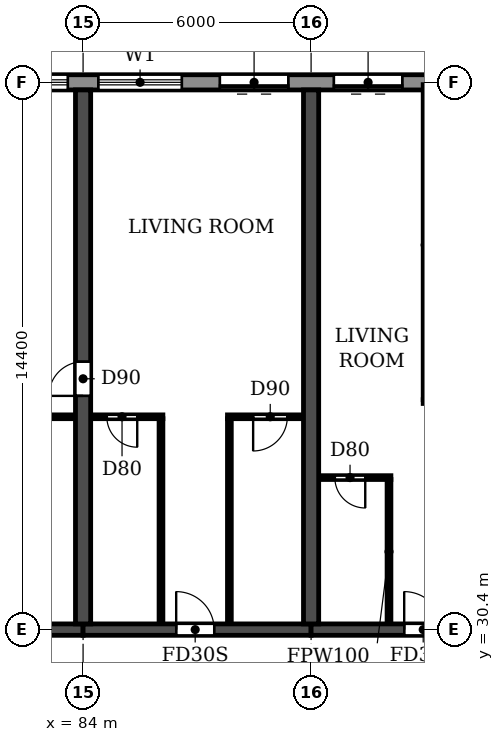
"""IFC4 building model, lengths in metres.
Left out: names, types, materials, properties, quantities, classifications, styles, units other than length and angle.
Written with IfcOpenShell. Run it as: python <this file> out.ifc"""

import sys

from ifc_helpers import new_model, si_unit, direction, frame, frame_2d, origin, place, context, subcontext, project, spatial, rectangle, extrude, element, fill, save


model = new_model("IFC4")
c1 = context("Model", 3, precision=1e-05, world=origin(), true_north=direction((0.0, 1.0)))
c2 = subcontext(c1, "Body", "Model", "MODEL_VIEW")
j1 = project(units=[si_unit("LENGTHUNIT", "METRE"), si_unit("PLANEANGLEUNIT", "RADIAN")], contexts=[c1])
p1 = place(None, origin())
s1 = spatial("IfcSite", under=j1, at=p1, CompositionType="ELEMENT")
p2 = place(p1, origin())
s2 = spatial("IfcBuilding", under=s1, at=p2, CompositionType="ELEMENT")
p3 = place(p2, frame((0.0, 0.0, 23.4)))
s3 = spatial("IfcBuildingStorey", under=s2, at=p3, CompositionType="ELEMENT", Elevation=23.4)
p4 = place(p3, frame((84.0, 30.55, 0.0), z_axis=(0.0, 0.0, 1.0), x_axis=(0.0, 1.0, 0.0)))
e1 = element("IfcWall", 1, at=p4, inside=s3, PredefinedType="SHEAR", context=c2, shape_type="SweptSolid", body=[
    extrude(rectangle(XDim=14.05, YDim=0.4, at=frame_2d((7.025, 0.0))), origin(), (0.0, 0.0, 1.0), 3.05),
])
p5 = place(p4, frame((6.0, 0.0, 0.0)))
e2 = element("IfcOpeningElement", 2, at=p5, cuts=e1, PredefinedType="OPENING", context=c2, shape_type="SweptSolid", body=[
    extrude(rectangle(XDim=0.9, YDim=2.1, at=frame_2d((0.45, 1.05))), frame((0.0, 0.21, 0.0), z_axis=(0.0, -1.0, 0.0), x_axis=(1.0, 0.0, 0.0)), (0.0, 0.0, 1.0), 0.42),
])
p6 = place(p3, frame((90.0, 30.55, 0.0), z_axis=(0.0, 0.0, 1.0), x_axis=(0.0, 1.0, 0.0)))
e3 = element("IfcWall", 3, at=p6, inside=s3, PredefinedType="SHEAR", context=c2, shape_type="SweptSolid", body=[
    extrude(rectangle(XDim=14.05, YDim=0.4, at=frame_2d((7.025, 0.0))), origin(), (0.0, 0.0, 1.0), 3.05),
])
p7 = place(p3, frame((78.0, 30.4, 0.0), z_axis=(0.0, 0.0, 1.0), x_axis=(1.0, 0.0, 0.0)))
e4 = element("IfcWall", 4, at=p7, inside=s3, PredefinedType="SHEAR", context=c2, shape_type="SweptSolid", body=[
    extrude(rectangle(XDim=6.0, YDim=0.3, at=frame_2d((3.0, 0.0))), origin(), (0.0, 0.0, 1.0), 2.45),
])
p8 = place(p3, frame((84.0, 30.4, 0.0), z_axis=(0.0, 0.0, 1.0), x_axis=(1.0, 0.0, 0.0)))
e5 = element("IfcWall", 5, at=p8, inside=s3, PredefinedType="SHEAR", context=c2, shape_type="SweptSolid", body=[
    extrude(rectangle(XDim=6.0, YDim=0.3, at=frame_2d((3.0, 0.0))), origin(), (0.0, 0.0, 1.0), 2.45),
])
p9 = place(p8, frame((2.45, 0.0, 0.0)))
e6 = element("IfcOpeningElement", 6, at=p9, cuts=e5, PredefinedType="OPENING", context=c2, shape_type="SweptSolid", body=[
    extrude(rectangle(XDim=1.0, YDim=2.1, at=frame_2d((0.5, 1.05))), frame((0.0, 0.16, 0.0), z_axis=(0.0, -1.0, 0.0), x_axis=(1.0, 0.0, 0.0)), (0.0, 0.0, 1.0), 0.32),
])
p10 = place(p3, frame((90.0, 30.4, 0.0), z_axis=(0.0, 0.0, 1.0), x_axis=(1.0, 0.0, 0.0)))
e7 = element("IfcWall", 7, at=p10, inside=s3, PredefinedType="SHEAR", context=c2, shape_type="SweptSolid", body=[
    extrude(rectangle(XDim=6.0, YDim=0.3, at=frame_2d((3.0, 0.0))), origin(), (0.0, 0.0, 1.0), 2.45),
])
p11 = place(p10, frame((2.45, 0.0, 0.0)))
e8 = element("IfcOpeningElement", 8, at=p11, cuts=e7, PredefinedType="OPENING", context=c2, shape_type="SweptSolid", body=[
    extrude(rectangle(XDim=1.0, YDim=2.1, at=frame_2d((0.5, 1.05))), frame((0.0, 0.16, 0.0), z_axis=(0.0, -1.0, 0.0), x_axis=(1.0, 0.0, 0.0)), (0.0, 0.0, 1.0), 0.32),
])
p12 = place(p3, frame((97.317, 44.8, 0.0), z_axis=(0.0, 0.0, 1.0), x_axis=(-1.0, 0.0, 0.0)))
e9 = element("IfcWall", 9, at=p12, inside=s3, PredefinedType="STANDARD", context=c2, shape_type="SweptSolid", body=[
    extrude(rectangle(XDim=92.634, YDim=0.4, at=frame_2d((46.317, 0.0))), origin(), (0.0, 0.0, 1.0), 3.05),
])
p13 = place(p12, frame((88.717, 0.0, 0.9)))
e10 = element("IfcOpeningElement", 10, at=p13, cuts=e9, PredefinedType="OPENING", context=c2, shape_type="SweptSolid", body=[
    extrude(rectangle(XDim=2.2, YDim=1.5, at=frame_2d((1.1, 0.75))), frame((0.0, 0.21, 0.0), z_axis=(0.0, -1.0, 0.0), x_axis=(1.0, 0.0, 0.0)), (0.0, 0.0, 1.0), 0.42),
])
p14 = place(p12, frame((85.917, 0.0, 0.0)))
e11 = element("IfcOpeningElement", 11, at=p14, cuts=e9, PredefinedType="OPENING", context=c2, shape_type="SweptSolid", body=[
    extrude(rectangle(XDim=1.8, YDim=2.4, at=frame_2d((0.9, 1.2))), frame((0.0, 0.21, 0.0), z_axis=(0.0, -1.0, 0.0), x_axis=(1.0, 0.0, 0.0)), (0.0, 0.0, 1.0), 0.42),
])
p15 = place(p12, frame((82.717, 0.0, 0.9)))
e12 = element("IfcOpeningElement", 12, at=p15, cuts=e9, PredefinedType="OPENING", context=c2, shape_type="SweptSolid", body=[
    extrude(rectangle(XDim=2.2, YDim=1.5, at=frame_2d((1.1, 0.75))), frame((0.0, 0.21, 0.0), z_axis=(0.0, -1.0, 0.0), x_axis=(1.0, 0.0, 0.0)), (0.0, 0.0, 1.0), 0.42),
])
p16 = place(p12, frame((79.717, 0.0, 0.9)))
e13 = element("IfcOpeningElement", 13, at=p16, cuts=e9, PredefinedType="OPENING", context=c2, shape_type="SweptSolid", body=[
    extrude(rectangle(XDim=2.2, YDim=1.5, at=frame_2d((1.1, 0.75))), frame((0.0, 0.21, 0.0), z_axis=(0.0, -1.0, 0.0), x_axis=(1.0, 0.0, 0.0)), (0.0, 0.0, 1.0), 0.42),
])
p17 = place(p12, frame((76.917, 0.0, 0.0)))
e14 = element("IfcOpeningElement", 14, at=p17, cuts=e9, PredefinedType="OPENING", context=c2, shape_type="SweptSolid", body=[
    extrude(rectangle(XDim=1.8, YDim=2.4, at=frame_2d((0.9, 1.2))), frame((0.0, 0.21, 0.0), z_axis=(0.0, -1.0, 0.0), x_axis=(1.0, 0.0, 0.0)), (0.0, 0.0, 1.0), 0.42),
])
p18 = place(p12, frame((73.717, 0.0, 0.9)))
e15 = element("IfcOpeningElement", 15, at=p18, cuts=e9, PredefinedType="OPENING", context=c2, shape_type="SweptSolid", body=[
    extrude(rectangle(XDim=2.2, YDim=1.5, at=frame_2d((1.1, 0.75))), frame((0.0, 0.21, 0.0), z_axis=(0.0, -1.0, 0.0), x_axis=(1.0, 0.0, 0.0)), (0.0, 0.0, 1.0), 0.42),
])
p19 = place(p12, frame((70.717, 0.0, 0.9)))
e16 = element("IfcOpeningElement", 16, at=p19, cuts=e9, PredefinedType="OPENING", context=c2, shape_type="SweptSolid", body=[
    extrude(rectangle(XDim=2.2, YDim=1.5, at=frame_2d((1.1, 0.75))), frame((0.0, 0.21, 0.0), z_axis=(0.0, -1.0, 0.0), x_axis=(1.0, 0.0, 0.0)), (0.0, 0.0, 1.0), 0.42),
])
p20 = place(p12, frame((67.717, 0.0, 0.9)))
e17 = element("IfcOpeningElement", 17, at=p20, cuts=e9, PredefinedType="OPENING", context=c2, shape_type="SweptSolid", body=[
    extrude(rectangle(XDim=2.2, YDim=1.5, at=frame_2d((1.1, 0.75))), frame((0.0, 0.21, 0.0), z_axis=(0.0, -1.0, 0.0), x_axis=(1.0, 0.0, 0.0)), (0.0, 0.0, 1.0), 0.42),
])
p21 = place(p12, frame((64.917, 0.0, 0.0)))
e18 = element("IfcOpeningElement", 18, at=p21, cuts=e9, PredefinedType="OPENING", context=c2, shape_type="SweptSolid", body=[
    extrude(rectangle(XDim=1.8, YDim=2.4, at=frame_2d((0.9, 1.2))), frame((0.0, 0.21, 0.0), z_axis=(0.0, -1.0, 0.0), x_axis=(1.0, 0.0, 0.0)), (0.0, 0.0, 1.0), 0.42),
])
p22 = place(p12, frame((61.717, 0.0, 0.9)))
e19 = element("IfcOpeningElement", 19, at=p22, cuts=e9, PredefinedType="OPENING", context=c2, shape_type="SweptSolid", body=[
    extrude(rectangle(XDim=2.2, YDim=1.5, at=frame_2d((1.1, 0.75))), frame((0.0, 0.21, 0.0), z_axis=(0.0, -1.0, 0.0), x_axis=(1.0, 0.0, 0.0)), (0.0, 0.0, 1.0), 0.42),
])
p23 = place(p12, frame((58.717, 0.0, 0.9)))
e20 = element("IfcOpeningElement", 20, at=p23, cuts=e9, PredefinedType="OPENING", context=c2, shape_type="SweptSolid", body=[
    extrude(rectangle(XDim=2.2, YDim=1.5, at=frame_2d((1.1, 0.75))), frame((0.0, 0.21, 0.0), z_axis=(0.0, -1.0, 0.0), x_axis=(1.0, 0.0, 0.0)), (0.0, 0.0, 1.0), 0.42),
])
p24 = place(p12, frame((55.917, 0.0, 0.0)))
e21 = element("IfcOpeningElement", 21, at=p24, cuts=e9, PredefinedType="OPENING", context=c2, shape_type="SweptSolid", body=[
    extrude(rectangle(XDim=1.8, YDim=2.4, at=frame_2d((0.9, 1.2))), frame((0.0, 0.21, 0.0), z_axis=(0.0, -1.0, 0.0), x_axis=(1.0, 0.0, 0.0)), (0.0, 0.0, 1.0), 0.42),
])
p25 = place(p12, frame((52.917, 0.0, 0.0)))
e22 = element("IfcOpeningElement", 22, at=p25, cuts=e9, PredefinedType="OPENING", context=c2, shape_type="SweptSolid", body=[
    extrude(rectangle(XDim=1.8, YDim=2.4, at=frame_2d((0.9, 1.2))), frame((0.0, 0.21, 0.0), z_axis=(0.0, -1.0, 0.0), x_axis=(1.0, 0.0, 0.0)), (0.0, 0.0, 1.0), 0.42),
])
p26 = place(p12, frame((49.717, 0.0, 0.9)))
e23 = element("IfcOpeningElement", 23, at=p26, cuts=e9, PredefinedType="OPENING", context=c2, shape_type="SweptSolid", body=[
    extrude(rectangle(XDim=2.2, YDim=1.5, at=frame_2d((1.1, 0.75))), frame((0.0, 0.21, 0.0), z_axis=(0.0, -1.0, 0.0), x_axis=(1.0, 0.0, 0.0)), (0.0, 0.0, 1.0), 0.42),
])
p27 = place(p12, frame((46.917, 0.0, 0.0)))
e24 = element("IfcOpeningElement", 24, at=p27, cuts=e9, PredefinedType="OPENING", context=c2, shape_type="SweptSolid", body=[
    extrude(rectangle(XDim=1.8, YDim=2.4, at=frame_2d((0.9, 1.2))), frame((0.0, 0.21, 0.0), z_axis=(0.0, -1.0, 0.0), x_axis=(1.0, 0.0, 0.0)), (0.0, 0.0, 1.0), 0.42),
])
p28 = place(p12, frame((43.717, 0.0, 0.9)))
e25 = element("IfcOpeningElement", 25, at=p28, cuts=e9, PredefinedType="OPENING", context=c2, shape_type="SweptSolid", body=[
    extrude(rectangle(XDim=2.2, YDim=1.5, at=frame_2d((1.1, 0.75))), frame((0.0, 0.21, 0.0), z_axis=(0.0, -1.0, 0.0), x_axis=(1.0, 0.0, 0.0)), (0.0, 0.0, 1.0), 0.42),
])
p29 = place(p12, frame((40.717, 0.0, 0.9)))
e26 = element("IfcOpeningElement", 26, at=p29, cuts=e9, PredefinedType="OPENING", context=c2, shape_type="SweptSolid", body=[
    extrude(rectangle(XDim=2.2, YDim=1.5, at=frame_2d((1.1, 0.75))), frame((0.0, 0.21, 0.0), z_axis=(0.0, -1.0, 0.0), x_axis=(1.0, 0.0, 0.0)), (0.0, 0.0, 1.0), 0.42),
])
p30 = place(p12, frame((37.917, 0.0, 0.0)))
e27 = element("IfcOpeningElement", 27, at=p30, cuts=e9, PredefinedType="OPENING", context=c2, shape_type="SweptSolid", body=[
    extrude(rectangle(XDim=1.8, YDim=2.4, at=frame_2d((0.9, 1.2))), frame((0.0, 0.21, 0.0), z_axis=(0.0, -1.0, 0.0), x_axis=(1.0, 0.0, 0.0)), (0.0, 0.0, 1.0), 0.42),
])
p31 = place(p12, frame((34.917, 0.0, 0.0)))
e28 = element("IfcOpeningElement", 28, at=p31, cuts=e9, PredefinedType="OPENING", context=c2, shape_type="SweptSolid", body=[
    extrude(rectangle(XDim=1.8, YDim=2.4, at=frame_2d((0.9, 1.2))), frame((0.0, 0.21, 0.0), z_axis=(0.0, -1.0, 0.0), x_axis=(1.0, 0.0, 0.0)), (0.0, 0.0, 1.0), 0.42),
])
p32 = place(p12, frame((31.717, 0.0, 0.9)))
e29 = element("IfcOpeningElement", 29, at=p32, cuts=e9, PredefinedType="OPENING", context=c2, shape_type="SweptSolid", body=[
    extrude(rectangle(XDim=2.2, YDim=1.5, at=frame_2d((1.1, 0.75))), frame((0.0, 0.21, 0.0), z_axis=(0.0, -1.0, 0.0), x_axis=(1.0, 0.0, 0.0)), (0.0, 0.0, 1.0), 0.42),
])
p33 = place(p12, frame((28.717, 0.0, 0.9)))
e30 = element("IfcOpeningElement", 30, at=p33, cuts=e9, PredefinedType="OPENING", context=c2, shape_type="SweptSolid", body=[
    extrude(rectangle(XDim=2.2, YDim=1.5, at=frame_2d((1.1, 0.75))), frame((0.0, 0.21, 0.0), z_axis=(0.0, -1.0, 0.0), x_axis=(1.0, 0.0, 0.0)), (0.0, 0.0, 1.0), 0.42),
])
p34 = place(p12, frame((25.717, 0.0, 0.9)))
e31 = element("IfcOpeningElement", 31, at=p34, cuts=e9, PredefinedType="OPENING", context=c2, shape_type="SweptSolid", body=[
    extrude(rectangle(XDim=2.2, YDim=1.5, at=frame_2d((1.1, 0.75))), frame((0.0, 0.21, 0.0), z_axis=(0.0, -1.0, 0.0), x_axis=(1.0, 0.0, 0.0)), (0.0, 0.0, 1.0), 0.42),
])
p35 = place(p12, frame((22.717, 0.0, 0.9)))
e32 = element("IfcOpeningElement", 32, at=p35, cuts=e9, PredefinedType="OPENING", context=c2, shape_type="SweptSolid", body=[
    extrude(rectangle(XDim=2.2, YDim=1.5, at=frame_2d((1.1, 0.75))), frame((0.0, 0.21, 0.0), z_axis=(0.0, -1.0, 0.0), x_axis=(1.0, 0.0, 0.0)), (0.0, 0.0, 1.0), 0.42),
])
p36 = place(p12, frame((19.917, 0.0, 0.0)))
e33 = element("IfcOpeningElement", 33, at=p36, cuts=e9, PredefinedType="OPENING", context=c2, shape_type="SweptSolid", body=[
    extrude(rectangle(XDim=1.8, YDim=2.4, at=frame_2d((0.9, 1.2))), frame((0.0, 0.21, 0.0), z_axis=(0.0, -1.0, 0.0), x_axis=(1.0, 0.0, 0.0)), (0.0, 0.0, 1.0), 0.42),
])
p37 = place(p12, frame((16.717, 0.0, 0.9)))
e34 = element("IfcOpeningElement", 34, at=p37, cuts=e9, PredefinedType="OPENING", context=c2, shape_type="SweptSolid", body=[
    extrude(rectangle(XDim=2.2, YDim=1.5, at=frame_2d((1.1, 0.75))), frame((0.0, 0.21, 0.0), z_axis=(0.0, -1.0, 0.0), x_axis=(1.0, 0.0, 0.0)), (0.0, 0.0, 1.0), 0.42),
])
p38 = place(p12, frame((13.717, 0.0, 0.9)))
e35 = element("IfcOpeningElement", 35, at=p38, cuts=e9, PredefinedType="OPENING", context=c2, shape_type="SweptSolid", body=[
    extrude(rectangle(XDim=2.2, YDim=1.5, at=frame_2d((1.1, 0.75))), frame((0.0, 0.21, 0.0), z_axis=(0.0, -1.0, 0.0), x_axis=(1.0, 0.0, 0.0)), (0.0, 0.0, 1.0), 0.42),
])
p39 = place(p12, frame((10.717, 0.0, 0.9)))
e36 = element("IfcOpeningElement", 36, at=p39, cuts=e9, PredefinedType="OPENING", context=c2, shape_type="SweptSolid", body=[
    extrude(rectangle(XDim=2.2, YDim=1.5, at=frame_2d((1.1, 0.75))), frame((0.0, 0.21, 0.0), z_axis=(0.0, -1.0, 0.0), x_axis=(1.0, 0.0, 0.0)), (0.0, 0.0, 1.0), 0.42),
])
p40 = place(p12, frame((7.917, 0.0, 0.0)))
e37 = element("IfcOpeningElement", 37, at=p40, cuts=e9, PredefinedType="OPENING", context=c2, shape_type="SweptSolid", body=[
    extrude(rectangle(XDim=1.8, YDim=2.4, at=frame_2d((0.9, 1.2))), frame((0.0, 0.21, 0.0), z_axis=(0.0, -1.0, 0.0), x_axis=(1.0, 0.0, 0.0)), (0.0, 0.0, 1.0), 0.42),
])
p41 = place(p12, frame((4.917, 0.0, 0.0)))
e38 = element("IfcOpeningElement", 38, at=p41, cuts=e9, PredefinedType="OPENING", context=c2, shape_type="SweptSolid", body=[
    extrude(rectangle(XDim=1.8, YDim=2.4, at=frame_2d((0.9, 1.2))), frame((0.0, 0.21, 0.0), z_axis=(0.0, -1.0, 0.0), x_axis=(1.0, 0.0, 0.0)), (0.0, 0.0, 1.0), 0.42),
])
p42 = place(p12, frame((1.717, 0.0, 0.9)))
e39 = element("IfcOpeningElement", 39, at=p42, cuts=e9, PredefinedType="OPENING", context=c2, shape_type="SweptSolid", body=[
    extrude(rectangle(XDim=2.2, YDim=1.5, at=frame_2d((1.1, 0.75))), frame((0.0, 0.21, 0.0), z_axis=(0.0, -1.0, 0.0), x_axis=(1.0, 0.0, 0.0)), (0.0, 0.0, 1.0), 0.42),
])
p43 = place(p3, frame((90.21, 34.4, 0.0), z_axis=(0.0, 0.0, 1.0), x_axis=(1.0, 0.0, 0.0)))
e40 = element("IfcWall", 40, at=p43, inside=s3, PredefinedType="PARTITIONING", context=c2, shape_type="SweptSolid", body=[
    extrude(rectangle(XDim=1.89, YDim=0.1, at=frame_2d((0.945, 0.0))), origin(), (0.0, 0.0, 1.0), 3.05),
])
p44 = place(p43, frame((0.415, 0.0, 0.0)))
e41 = element("IfcOpeningElement", 41, at=p44, cuts=e40, PredefinedType="OPENING", context=c2, shape_type="SweptSolid", body=[
    extrude(rectangle(XDim=0.8, YDim=2.1, at=frame_2d((0.4, 1.05))), frame((0.0, 0.06, 0.0), z_axis=(0.0, -1.0, 0.0), x_axis=(1.0, 0.0, 0.0)), (0.0, 0.0, 1.0), 0.12),
])
p45 = place(p3, frame((81.1, 36.0, 0.0), z_axis=(0.0, 0.0, 1.0), x_axis=(1.0, 0.0, 0.0)))
e42 = element("IfcWall", 42, at=p45, inside=s3, PredefinedType="PARTITIONING", context=c2, shape_type="SweptSolid", body=[
    extrude(rectangle(XDim=2.69, YDim=0.1, at=frame_2d((1.345, 0.0))), origin(), (0.0, 0.0, 1.0), 3.05),
])
p46 = place(p45, frame((1.0, 0.0, 0.0)))
e43 = element("IfcOpeningElement", 43, at=p46, cuts=e42, PredefinedType="OPENING", context=c2, shape_type="SweptSolid", body=[
    extrude(rectangle(XDim=0.8, YDim=2.1, at=frame_2d((0.4, 1.05))), frame((0.0, 0.06, 0.0), z_axis=(0.0, -1.0, 0.0), x_axis=(1.0, 0.0, 0.0)), (0.0, 0.0, 1.0), 0.12),
])
p47 = place(p3, frame((84.21, 36.0, 0.0), z_axis=(0.0, 0.0, 1.0), x_axis=(1.0, 0.0, 0.0)))
e44 = element("IfcWall", 44, at=p47, inside=s3, PredefinedType="PARTITIONING", context=c2, shape_type="SweptSolid", body=[
    extrude(rectangle(XDim=1.89, YDim=0.1, at=frame_2d((0.945, 0.0))), origin(), (0.0, 0.0, 1.0), 3.05),
])
p48 = place(p47, frame((0.415, 0.0, 0.0)))
e45 = element("IfcOpeningElement", 45, at=p48, cuts=e44, PredefinedType="OPENING", context=c2, shape_type="SweptSolid", body=[
    extrude(rectangle(XDim=0.8, YDim=2.1, at=frame_2d((0.4, 1.05))), frame((0.0, 0.06, 0.0), z_axis=(0.0, -1.0, 0.0), x_axis=(1.0, 0.0, 0.0)), (0.0, 0.0, 1.0), 0.12),
])
p49 = place(p3, frame((87.8, 36.0, 0.0), z_axis=(0.0, 0.0, 1.0), x_axis=(1.0, 0.0, 0.0)))
e46 = element("IfcWall", 46, at=p49, inside=s3, PredefinedType="PARTITIONING", context=c2, shape_type="SweptSolid", body=[
    extrude(rectangle(XDim=1.99, YDim=0.1, at=frame_2d((0.995, 0.0))), origin(), (0.0, 0.0, 1.0), 3.05),
])
p50 = place(p49, frame((0.675, 0.0, 0.0)))
e47 = element("IfcOpeningElement", 47, at=p50, cuts=e46, PredefinedType="OPENING", context=c2, shape_type="SweptSolid", body=[
    extrude(rectangle(XDim=0.9, YDim=2.1, at=frame_2d((0.45, 1.05))), frame((0.0, 0.06, 0.0), z_axis=(0.0, -1.0, 0.0), x_axis=(1.0, 0.0, 0.0)), (0.0, 0.0, 1.0), 0.12),
])
p51 = place(p3, frame((92.95, 36.4, 0.0), z_axis=(0.0, 0.0, 1.0), x_axis=(1.0, 0.0, 0.0)))
e48 = element("IfcWall", 48, at=p51, inside=s3, PredefinedType="PARTITIONING", context=c2, shape_type="SweptSolid", body=[
    extrude(rectangle(XDim=2.84, YDim=0.1, at=frame_2d((1.42, 0.0))), origin(), (0.0, 0.0, 1.0), 3.05),
])
p52 = place(p51, frame((0.55, 0.0, 0.0)))
e49 = element("IfcOpeningElement", 49, at=p52, cuts=e48, PredefinedType="OPENING", context=c2, shape_type="SweptSolid", body=[
    extrude(rectangle(XDim=0.9, YDim=2.1, at=frame_2d((0.45, 1.05))), frame((0.0, 0.06, 0.0), z_axis=(0.0, -1.0, 0.0), x_axis=(1.0, 0.0, 0.0)), (0.0, 0.0, 1.0), 0.12),
])
for number, where, z_axis, x_axis in (
    (50, (86.05, 30.56, 0.0), (0.0, 0.0, 1.0), (0.0, 1.0, 0.0)),
    (51, (87.85, 30.56, 0.0), (0.0, 0.0, 1.0), (0.0, 1.0, 0.0)),
):
    element("IfcWall", number, at=place(p3, frame(where, z_axis=z_axis, x_axis=x_axis)), inside=s3, PredefinedType="PARTITIONING", context=c2, shape_type="SweptSolid", body=[
        extrude(rectangle(XDim=5.39, YDim=0.1, at=frame_2d((2.695, 0.0))), origin(), (0.0, 0.0, 1.0), 3.05),
    ])
p53 = place(p3, frame((92.05, 30.56, 0.0), z_axis=(0.0, 0.0, 1.0), x_axis=(0.0, 1.0, 0.0)))
e52 = element("IfcWall", 52, at=p53, inside=s3, PredefinedType="PARTITIONING", context=c2, shape_type="SweptSolid", body=[
    extrude(rectangle(XDim=3.79, YDim=0.1, at=frame_2d((1.895, 0.0))), origin(), (0.0, 0.0, 1.0), 3.05),
])
p54 = place(p3, frame((93.0, 36.45, 0.0), z_axis=(0.0, 0.0, 1.0), x_axis=(0.0, 1.0, 0.0)))
e53 = element("IfcWall", 53, at=p54, inside=s3, PredefinedType="PARTITIONING", context=c2, shape_type="SweptSolid", body=[
    extrude(rectangle(XDim=8.29, YDim=0.1, at=frame_2d((4.145, 0.0))), origin(), (0.0, 0.0, 1.0), 3.05),
])
p55 = place(p38, origin())
e54 = element("IfcWindow", 54, at=p55, inside=s3, PartitioningType="DOUBLE_PANEL_HORIZONTAL", PredefinedType="WINDOW", context=c2, shape_type="SweptSolid", body=[
    extrude(rectangle(XDim=2.2, YDim=1.5, at=frame_2d((1.1, 0.75))), frame((0.0, 0.03, 0.0), z_axis=(0.0, -1.0, 0.0), x_axis=(1.0, 0.0, 0.0)), (0.0, 0.0, 1.0), 0.06),
])
fill(e35, e54)
p56 = place(p39, origin())
e55 = element("IfcWindow", 55, at=p56, inside=s3, PartitioningType="DOUBLE_PANEL_HORIZONTAL", PredefinedType="WINDOW", context=c2, shape_type="SweptSolid", body=[
    extrude(rectangle(XDim=2.2, YDim=1.5, at=frame_2d((1.1, 0.75))), frame((0.0, 0.03, 0.0), z_axis=(0.0, -1.0, 0.0), x_axis=(1.0, 0.0, 0.0)), (0.0, 0.0, 1.0), 0.06),
])
fill(e36, e55)
p57 = place(p40, origin())
e56 = element("IfcDoor", 56, at=p57, inside=s3, OperationType="DOUBLE_DOOR_SLIDING", PredefinedType="DOOR", context=c2, shape_type="SweptSolid", body=[
    extrude(rectangle(XDim=1.8, YDim=2.4, at=frame_2d((0.9, 1.2))), frame((0.0, 0.025, 0.0), z_axis=(0.0, -1.0, 0.0), x_axis=(1.0, 0.0, 0.0)), (0.0, 0.0, 1.0), 0.05),
])
fill(e37, e56)
p58 = place(p41, origin())
e57 = element("IfcDoor", 57, at=p58, inside=s3, OperationType="DOUBLE_DOOR_SLIDING", PredefinedType="DOOR", context=c2, shape_type="SweptSolid", body=[
    extrude(rectangle(XDim=1.8, YDim=2.4, at=frame_2d((0.9, 1.2))), frame((0.0, 0.025, 0.0), z_axis=(0.0, -1.0, 0.0), x_axis=(1.0, 0.0, 0.0)), (0.0, 0.0, 1.0), 0.05),
])
fill(e38, e57)
p59 = place(p5, origin())
e58 = element("IfcDoor", 58, at=p59, inside=s3, OperationType="SINGLE_SWING_LEFT", PredefinedType="DOOR", context=c2, shape_type="SweptSolid", body=[
    extrude(rectangle(XDim=0.9, YDim=2.1, at=frame_2d((0.45, 1.05))), frame((0.0, 0.025, 0.0), z_axis=(0.0, -1.0, 0.0), x_axis=(1.0, 0.0, 0.0)), (0.0, 0.0, 1.0), 0.05),
])
fill(e2, e58)
p60 = place(p48, frame((0.8, 0.0, 0.0), z_axis=(0.0, 0.0, 1.0), x_axis=(-1.0, 0.0, 0.0)))
e59 = element("IfcDoor", 59, at=p60, inside=s3, OperationType="SINGLE_SWING_LEFT", PredefinedType="DOOR", context=c2, shape_type="SweptSolid", body=[
    extrude(rectangle(XDim=0.8, YDim=2.1, at=frame_2d((0.4, 1.05))), frame((0.0, 0.025, 0.0), z_axis=(0.0, -1.0, 0.0), x_axis=(1.0, 0.0, 0.0)), (0.0, 0.0, 1.0), 0.05),
])
fill(e45, e59)
p61 = place(p9, origin())
e60 = element("IfcDoor", 60, at=p61, inside=s3, OperationType="SINGLE_SWING_LEFT", PredefinedType="DOOR", context=c2, shape_type="SweptSolid", body=[
    extrude(rectangle(XDim=1.0, YDim=2.1, at=frame_2d((0.5, 1.05))), frame((0.0, 0.025, 0.0), z_axis=(0.0, -1.0, 0.0), x_axis=(1.0, 0.0, 0.0)), (0.0, 0.0, 1.0), 0.05),
])
fill(e6, e60)
p62 = place(p50, frame((0.9, 0.0, 0.0), z_axis=(0.0, 0.0, 1.0), x_axis=(-1.0, 0.0, 0.0)))
e61 = element("IfcDoor", 61, at=p62, inside=s3, OperationType="SINGLE_SWING_RIGHT", PredefinedType="DOOR", context=c2, shape_type="SweptSolid", body=[
    extrude(rectangle(XDim=0.9, YDim=2.1, at=frame_2d((0.45, 1.05))), frame((0.0, 0.025, 0.0), z_axis=(0.0, -1.0, 0.0), x_axis=(1.0, 0.0, 0.0)), (0.0, 0.0, 1.0), 0.05),
])
fill(e47, e61)
p63 = place(p44, frame((0.8, 0.0, 0.0), z_axis=(0.0, 0.0, 1.0), x_axis=(-1.0, 0.0, 0.0)))
e62 = element("IfcDoor", 62, at=p63, inside=s3, OperationType="SINGLE_SWING_LEFT", PredefinedType="DOOR", context=c2, shape_type="SweptSolid", body=[
    extrude(rectangle(XDim=0.8, YDim=2.1, at=frame_2d((0.4, 1.05))), frame((0.0, 0.025, 0.0), z_axis=(0.0, -1.0, 0.0), x_axis=(1.0, 0.0, 0.0)), (0.0, 0.0, 1.0), 0.05),
])
fill(e41, e62)
p64 = place(p11, origin())
e63 = element("IfcDoor", 63, at=p64, inside=s3, OperationType="SINGLE_SWING_LEFT", PredefinedType="DOOR", context=c2, shape_type="SweptSolid", body=[
    extrude(rectangle(XDim=1.0, YDim=2.1, at=frame_2d((0.5, 1.05))), frame((0.0, 0.025, 0.0), z_axis=(0.0, -1.0, 0.0), x_axis=(1.0, 0.0, 0.0)), (0.0, 0.0, 1.0), 0.05),
])
fill(e8, e63)
save(model, sys.argv[1])
